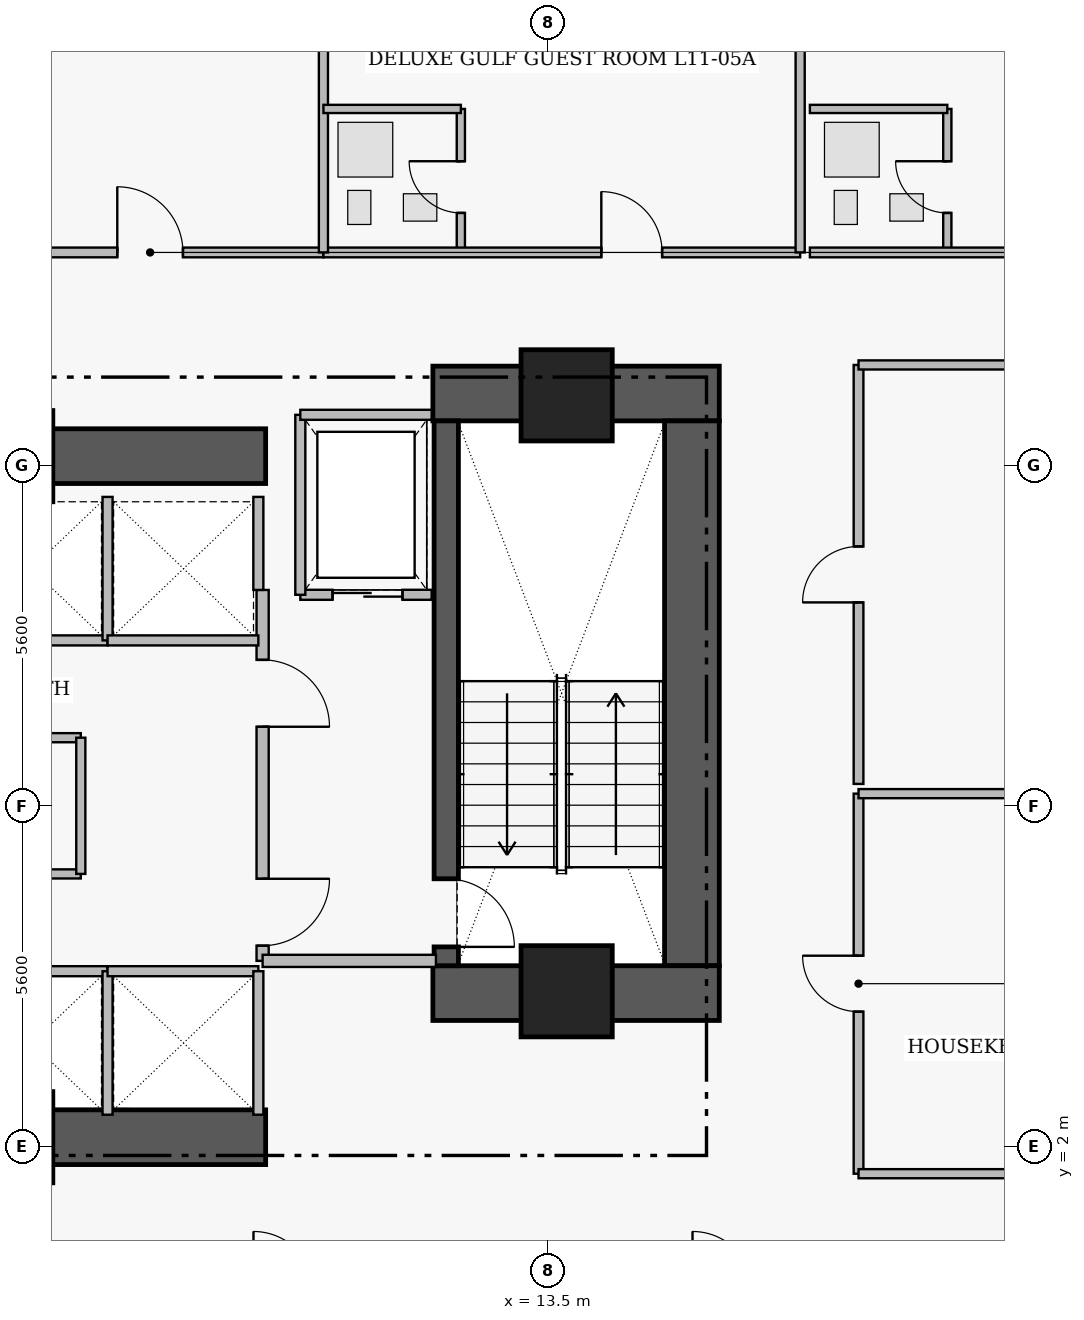
"""IFC4 building model, lengths in metres.
Left out: names, types, materials, properties, quantities, classifications, styles, units other than length and angle.
Written with IfcOpenShell. Run it as: python <this file> out.ifc"""

import sys

from ifc_helpers import new_model, si_unit, direction, frame, frame_2d, origin, origin_2d, place, context, subcontext, project, spatial, rectangle, extrude, element, fill, save


model = new_model("IFC4")
c1 = context("Model", 3, precision=1e-05, world=origin(), true_north=direction((0.0, 1.0)))
c2 = subcontext(c1, "Body", "Model", "MODEL_VIEW")
j1 = project(units=[si_unit("LENGTHUNIT", "METRE"), si_unit("PLANEANGLEUNIT", "RADIAN")], contexts=[c1])
p1 = place(None, origin())
s1 = spatial("IfcSite", under=j1, at=p1, CompositionType="ELEMENT")
p2 = place(p1, origin())
s2 = spatial("IfcBuilding", under=s1, at=p2, CompositionType="ELEMENT")
p3 = place(p2, frame((0.0, 0.0, 49.5)))
s3 = spatial("IfcBuildingStorey", under=s2, at=p3, CompositionType="ELEMENT", Elevation=49.5)
p4 = place(p3, frame((11.6, 14.38, 0.0), z_axis=(0.0, 0.0, 1.0), x_axis=(1.0, 0.0, 0.0)))
e1 = element("IfcWall", 1, at=p4, inside=s3, PredefinedType="SHEAR", context=c2, shape_type="SweptSolid", body=[
    extrude(rectangle(XDim=4.71, YDim=0.9, at=frame_2d((2.355, 0.0))), origin(), (0.0, 0.0, 1.0), 3.46),
])
p5 = place(p3, frame((15.86, 4.97, 0.0), z_axis=(0.0, 0.0, 1.0), x_axis=(0.0, 1.0, 0.0)))
e2 = element("IfcWall", 2, at=p5, inside=s3, PredefinedType="SHEAR", context=c2, shape_type="SweptSolid", body=[
    extrude(rectangle(XDim=8.96, YDim=0.9, at=frame_2d((4.48, 0.0))), origin(), (0.0, 0.0, 1.0), 3.46),
])
p6 = place(p3, frame((11.6, 4.52, 0.0), z_axis=(0.0, 0.0, 1.0), x_axis=(1.0, 0.0, 0.0)))
e3 = element("IfcWall", 3, at=p6, inside=s3, PredefinedType="SHEAR", context=c2, shape_type="SweptSolid", body=[
    extrude(rectangle(XDim=4.71, YDim=0.9, at=frame_2d((2.355, 0.0))), origin(), (0.0, 0.0, 1.0), 3.46),
])
for number, where, z_axis, x_axis in (
    (4, (1.25, 2.15, 0.0), (0.0, 0.0, 1.0), (1.0, 0.0, 0.0)),
    (5, (1.25, 13.35, 0.0), (0.0, 0.0, 1.0), (1.0, 0.0, 0.0)),
):
    element("IfcWall", number, at=place(p3, frame(where, z_axis=z_axis, x_axis=x_axis)), inside=s3, PredefinedType="SHEAR", context=c2, shape_type="SweptSolid", body=[
        extrude(rectangle(XDim=7.6, YDim=0.9, at=frame_2d((3.8, 0.0))), origin(), (0.0, 0.0, 1.0), 3.43),
    ])
p7 = place(p3, frame((11.82, 13.93, 0.0), z_axis=(0.0, 0.0, 1.0), x_axis=(0.0, -1.0, 0.0)))
e6 = element("IfcWall", 6, at=p7, inside=s3, PredefinedType="SHEAR", context=c2, shape_type="SweptSolid", body=[
    extrude(rectangle(XDim=8.96, YDim=0.4, at=frame_2d((4.48, 0.0))), origin(), (0.0, 0.0, 1.0), 3.46),
])
p8 = place(p7, frame((7.53, 0.0, 0.0)))
e7 = element("IfcOpeningElement", 7, at=p8, cuts=e6, PredefinedType="OPENING", context=c2, shape_type="SweptSolid", body=[
    extrude(rectangle(XDim=1.12, YDim=2.22, at=frame_2d((0.56, 1.11))), frame((0.0, 0.21, 0.0), z_axis=(0.0, -1.0, 0.0), x_axis=(1.0, 0.0, 0.0)), (0.0, 0.0, 1.0), 0.42),
])
for number, where, z_axis, x_axis in (
    (8, (13.8, 14.35, 0.0), (0.0, 0.0, 1.0), (1.0, 0.0, 0.0)),
    (9, (13.8, 4.55, 0.0), (0.0, 0.0, 1.0), (1.0, 0.0, 0.0)),
):
    element("IfcColumn", number, at=place(p3, frame(where, z_axis=z_axis, x_axis=x_axis)), inside=s3, PredefinedType="COLUMN", context=c2, shape_type="SweptSolid", body=[
        extrude(rectangle(XDim=1.5, YDim=1.5, at=origin_2d()), origin(), (0.0, 0.0, 1.0), 3.65),
    ])
p9 = place(p3, frame((8.8, 11.15, 0.0), z_axis=(0.0, 0.0, 1.0), x_axis=(0.0, -1.0, 0.0)))
e10 = element("IfcWall", 10, at=p9, inside=s3, PredefinedType="PARTITIONING", context=c2, shape_type="SweptSolid", body=[
    extrude(rectangle(XDim=6.1, YDim=0.2, at=frame_2d((3.05, 0.0))), origin(), (0.0, 0.0, 1.0), 3.43),
])
p10 = place(p9, frame((1.15, 0.0, 0.0)))
e11 = element("IfcOpeningElement", 11, at=p10, cuts=e10, PredefinedType="OPENING", context=c2, shape_type="SweptSolid", body=[
    extrude(rectangle(XDim=1.1, YDim=2.2, at=frame_2d((0.55, 1.1))), frame((0.0, 0.11, 0.0), z_axis=(0.0, -1.0, 0.0), x_axis=(1.0, 0.0, 0.0)), (0.0, 0.0, 1.0), 0.22),
])
p11 = place(p9, frame((4.75, 0.0, 0.0)))
e12 = element("IfcOpeningElement", 12, at=p11, cuts=e10, PredefinedType="OPENING", context=c2, shape_type="SweptSolid", body=[
    extrude(rectangle(XDim=1.1, YDim=2.2, at=frame_2d((0.55, 1.1))), frame((0.0, 0.11, 0.0), z_axis=(0.0, -1.0, 0.0), x_axis=(1.0, 0.0, 0.0)), (0.0, 0.0, 1.0), 0.22),
])
p12 = place(p3, frame((9.42, 11.07, 0.0), z_axis=(0.0, 0.0, 1.0), x_axis=(1.0, 0.0, 0.0)))
e13 = element("IfcWall", 13, at=p12, inside=s3, PredefinedType="PARTITIONING", context=c2, shape_type="SweptSolid", body=[
    extrude(rectangle(XDim=2.16, YDim=0.165, at=frame_2d((1.08, 0.0))), origin(), (0.0, 0.0, 1.0), 3.43),
])
p13 = place(p12, frame((0.53, 0.0, 0.0)))
e14 = element("IfcOpeningElement", 14, at=p13, cuts=e13, PredefinedType="OPENING", context=c2, shape_type="SweptSolid", body=[
    extrude(rectangle(XDim=1.15, YDim=2.25, at=frame_2d((0.575, 1.125))), frame((0.0, 0.093, 0.0), z_axis=(0.0, -1.0, 0.0), x_axis=(1.0, 0.0, 0.0)), (0.0, 0.0, 1.0), 0.185),
])
p14 = place(p3, frame((1.32, 6.48, 0.0), z_axis=(0.0, 0.0, 1.0), x_axis=(1.0, 0.0, 0.0)))
e15 = element("IfcWall", 15, at=p14, inside=s3, PredefinedType="PARTITIONING", context=c2, shape_type="SweptSolid", body=[
    extrude(rectangle(XDim=4.49, YDim=0.15, at=frame_2d((2.245, 0.0))), origin(), (0.0, 0.0, 1.0), 3.43),
])
p15 = place(p14, frame((1.795, 0.0, 0.0)))
e16 = element("IfcOpeningElement", 16, at=p15, cuts=e15, PredefinedType="OPENING", context=c2, shape_type="SweptSolid", body=[
    extrude(rectangle(XDim=0.9, YDim=2.15, at=frame_2d((0.45, 1.075))), frame((0.0, 0.085, 0.0), z_axis=(0.0, -1.0, 0.0), x_axis=(1.0, 0.0, 0.0)), (0.0, 0.0, 1.0), 0.17),
])
p16 = place(p3, frame((2.2, 16.7, 0.0), z_axis=(0.0, 0.0, 1.0), x_axis=(1.0, 0.0, 0.0)))
e17 = element("IfcWall", 17, at=p16, inside=s3, PredefinedType="PARTITIONING", context=c2, shape_type="SweptSolid", body=[
    extrude(rectangle(XDim=7.6, YDim=0.16, at=frame_2d((3.8, 0.0))), origin(), (0.0, 0.0, 1.0), 2.973),
])
p17 = place(p16, frame((4.21, 0.0, 0.0)))
e18 = element("IfcOpeningElement", 18, at=p17, cuts=e17, PredefinedType="OPENING", context=c2, shape_type="SweptSolid", body=[
    extrude(rectangle(XDim=1.08, YDim=2.18, at=frame_2d((0.54, 1.09))), frame((0.0, 0.09, 0.0), z_axis=(0.0, -1.0, 0.0), x_axis=(1.0, 0.0, 0.0)), (0.0, 0.0, 1.0), 0.18),
])
p18 = place(p3, frame((12.06, 16.7, 0.0), z_axis=(0.0, 0.0, 1.0), x_axis=(0.0, 1.0, 0.0)))
e19 = element("IfcWall", 19, at=p18, inside=s3, PredefinedType="PLUMBINGWALL", context=c2, shape_type="SweptSolid", body=[
    extrude(rectangle(XDim=2.36, YDim=0.135, at=frame_2d((1.18, 0.0))), origin(), (0.0, 0.0, 1.0), 3.43),
])
p19 = place(p18, frame((0.65, 0.0, 0.0)))
e20 = element("IfcOpeningElement", 20, at=p19, cuts=e19, PredefinedType="OPENING", context=c2, shape_type="SweptSolid", body=[
    extrude(rectangle(XDim=0.85, YDim=2.1, at=frame_2d((0.425, 1.05))), frame((0.0, 0.077, 0.0), z_axis=(0.0, -1.0, 0.0), x_axis=(1.0, 0.0, 0.0)), (0.0, 0.0, 1.0), 0.155),
])
p20 = place(p3, frame((9.8, 16.7, 0.0), z_axis=(0.0, 0.0, 1.0), x_axis=(1.0, 0.0, 0.0)))
e21 = element("IfcWall", 21, at=p20, inside=s3, PredefinedType="PARTITIONING", context=c2, shape_type="SweptSolid", body=[
    extrude(rectangle(XDim=7.84, YDim=0.16, at=frame_2d((3.92, 0.0))), origin(), (0.0, 0.0, 1.0), 2.973),
])
p21 = place(p20, frame((4.57, 0.0, 0.0)))
e22 = element("IfcOpeningElement", 22, at=p21, cuts=e21, PredefinedType="OPENING", context=c2, shape_type="SweptSolid", body=[
    extrude(rectangle(XDim=1.0, YDim=2.15, at=frame_2d((0.5, 1.075))), frame((0.0, 0.09, 0.0), z_axis=(0.0, -1.0, 0.0), x_axis=(1.0, 0.0, 0.0)), (0.0, 0.0, 1.0), 0.18),
])
p22 = place(p3, frame((20.06, 16.7, 0.0), z_axis=(0.0, 0.0, 1.0), x_axis=(0.0, 1.0, 0.0)))
e23 = element("IfcWall", 23, at=p22, inside=s3, PredefinedType="PLUMBINGWALL", context=c2, shape_type="SweptSolid", body=[
    extrude(rectangle(XDim=2.36, YDim=0.135, at=frame_2d((1.18, 0.0))), origin(), (0.0, 0.0, 1.0), 3.43),
])
p23 = place(p22, frame((0.65, 0.0, 0.0)))
e24 = element("IfcOpeningElement", 24, at=p23, cuts=e23, PredefinedType="OPENING", context=c2, shape_type="SweptSolid", body=[
    extrude(rectangle(XDim=0.85, YDim=2.1, at=frame_2d((0.425, 1.05))), frame((0.0, 0.077, 0.0), z_axis=(0.0, -1.0, 0.0), x_axis=(1.0, 0.0, 0.0)), (0.0, 0.0, 1.0), 0.155),
])
p24 = place(p3, frame((17.8, 16.7, 0.0), z_axis=(0.0, 0.0, 1.0), x_axis=(1.0, 0.0, 0.0)))
e25 = element("IfcWall", 25, at=p24, inside=s3, PredefinedType="PARTITIONING", context=c2, shape_type="SweptSolid", body=[
    extrude(rectangle(XDim=7.84, YDim=0.16, at=frame_2d((3.92, 0.0))), origin(), (0.0, 0.0, 1.0), 3.43),
])
p25 = place(p24, frame((4.57, 0.0, 0.0)))
e26 = element("IfcOpeningElement", 26, at=p25, cuts=e25, PredefinedType="OPENING", context=c2, shape_type="SweptSolid", body=[
    extrude(rectangle(XDim=1.0, YDim=2.15, at=frame_2d((0.5, 1.075))), frame((0.0, 0.09, 0.0), z_axis=(0.0, -1.0, 0.0), x_axis=(1.0, 0.0, 0.0)), (0.0, 0.0, 1.0), 0.18),
])
p26 = place(p3, frame((18.6, 1.55, 0.0), z_axis=(0.0, 0.0, 1.0), x_axis=(0.0, 1.0, 0.0)))
e27 = element("IfcWall", 27, at=p26, inside=s3, PredefinedType="PARTITIONING", context=c2, shape_type="SweptSolid", body=[
    extrude(rectangle(XDim=6.25, YDim=0.16, at=frame_2d((3.125, 0.0))), origin(), (0.0, 0.0, 1.0), 3.43),
])
p27 = place(p26, frame((2.665, 0.0, 0.0)))
e28 = element("IfcOpeningElement", 28, at=p27, cuts=e27, PredefinedType="OPENING", context=c2, shape_type="SweptSolid", body=[
    extrude(rectangle(XDim=0.92, YDim=2.12, at=frame_2d((0.46, 1.06))), frame((0.0, 0.09, 0.0), z_axis=(0.0, -1.0, 0.0), x_axis=(1.0, 0.0, 0.0)), (0.0, 0.0, 1.0), 0.18),
])
p28 = place(p3, frame((18.6, 7.96, 0.0), z_axis=(0.0, 0.0, 1.0), x_axis=(0.0, 1.0, 0.0)))
e29 = element("IfcWall", 29, at=p28, inside=s3, PredefinedType="PARTITIONING", context=c2, shape_type="SweptSolid", body=[
    extrude(rectangle(XDim=6.89, YDim=0.16, at=frame_2d((3.445, 0.0))), origin(), (0.0, 0.0, 1.0), 3.43),
])
p29 = place(p28, frame((2.985, 0.0, 0.0)))
e30 = element("IfcOpeningElement", 30, at=p29, cuts=e29, PredefinedType="OPENING", context=c2, shape_type="SweptSolid", body=[
    extrude(rectangle(XDim=0.92, YDim=2.12, at=frame_2d((0.46, 1.06))), frame((0.0, 0.09, 0.0), z_axis=(0.0, -1.0, 0.0), x_axis=(1.0, 0.0, 0.0)), (0.0, 0.0, 1.0), 0.18),
])
p30 = place(p3, frame((8.8, 5.05, 0.0), z_axis=(0.0, 0.0, 1.0), x_axis=(1.0, 0.0, 0.0)))
e31 = element("IfcWall", 31, at=p30, inside=s3, PredefinedType="PARTITIONING", context=c2, shape_type="SweptSolid", body=[
    extrude(rectangle(XDim=2.85, YDim=0.2, at=frame_2d((1.425, 0.0))), origin(), (0.0, 0.0, 1.0), 3.43),
])
p31 = place(p3, frame((9.42, 11.07, 0.0), z_axis=(0.0, 0.0, 1.0), x_axis=(0.0, 1.0, 0.0)))
e32 = element("IfcWall", 32, at=p31, inside=s3, PredefinedType="PARTITIONING", context=c2, shape_type="SweptSolid", body=[
    extrude(rectangle(XDim=2.96, YDim=0.165, at=frame_2d((1.48, 0.0))), origin(), (0.0, 0.0, 1.0), 3.43),
])
p32 = place(p3, frame((9.42, 14.03, 0.0), z_axis=(0.0, 0.0, 1.0), x_axis=(1.0, 0.0, 0.0)))
e33 = element("IfcWall", 33, at=p32, inside=s3, PredefinedType="PARTITIONING", context=c2, shape_type="SweptSolid", body=[
    extrude(rectangle(XDim=2.16, YDim=0.165, at=frame_2d((1.08, 0.0))), origin(), (0.0, 0.0, 1.0), 3.43),
])
p33 = place(p3, frame((3.75, 4.88, 0.0), z_axis=(0.0, 0.0, 1.0), x_axis=(1.0, 0.0, 0.0)))
e34 = element("IfcWall", 34, at=p33, inside=s3, PredefinedType="PARTITIONING", context=c2, shape_type="SweptSolid", body=[
    extrude(rectangle(XDim=2.5, YDim=0.165, at=frame_2d((1.25, 0.0))), origin(), (0.0, 0.0, 1.0), 3.43),
])
p34 = place(p3, frame((6.25, 2.52, 0.0), z_axis=(0.0, 0.0, 1.0), x_axis=(0.0, 1.0, 0.0)))
e35 = element("IfcWall", 35, at=p34, inside=s3, PredefinedType="PARTITIONING", context=c2, shape_type="SweptSolid", body=[
    extrude(rectangle(XDim=2.36, YDim=0.165, at=frame_2d((1.18, 0.0))), origin(), (0.0, 0.0, 1.0), 3.43),
])
p35 = place(p3, frame((6.25, 4.88, 0.0), z_axis=(0.0, 0.0, 1.0), x_axis=(1.0, 0.0, 0.0)))
e36 = element("IfcWall", 36, at=p35, inside=s3, PredefinedType="PARTITIONING", context=c2, shape_type="SweptSolid", body=[
    extrude(rectangle(XDim=2.48, YDim=0.165, at=frame_2d((1.24, 0.0))), origin(), (0.0, 0.0, 1.0), 3.43),
])
p36 = place(p3, frame((8.73, 2.52, 0.0), z_axis=(0.0, 0.0, 1.0), x_axis=(0.0, 1.0, 0.0)))
e37 = element("IfcWall", 37, at=p36, inside=s3, PredefinedType="PARTITIONING", context=c2, shape_type="SweptSolid", body=[
    extrude(rectangle(XDim=2.36, YDim=0.165, at=frame_2d((1.18, 0.0))), origin(), (0.0, 0.0, 1.0), 3.43),
])
p37 = place(p3, frame((3.75, 10.32, 0.0), z_axis=(0.0, 0.0, 1.0), x_axis=(1.0, 0.0, 0.0)))
e38 = element("IfcWall", 38, at=p37, inside=s3, PredefinedType="PARTITIONING", context=c2, shape_type="SweptSolid", body=[
    extrude(rectangle(XDim=2.5, YDim=0.165, at=frame_2d((1.25, 0.0))), origin(), (0.0, 0.0, 1.0), 3.43),
])
p38 = place(p3, frame((6.25, 10.32, 0.0), z_axis=(0.0, 0.0, 1.0), x_axis=(0.0, 1.0, 0.0)))
e39 = element("IfcWall", 39, at=p38, inside=s3, PredefinedType="PARTITIONING", context=c2, shape_type="SweptSolid", body=[
    extrude(rectangle(XDim=2.36, YDim=0.165, at=frame_2d((1.18, 0.0))), origin(), (0.0, 0.0, 1.0), 3.43),
])
p39 = place(p3, frame((6.25, 10.32, 0.0), z_axis=(0.0, 0.0, 1.0), x_axis=(1.0, 0.0, 0.0)))
e40 = element("IfcWall", 40, at=p39, inside=s3, PredefinedType="PARTITIONING", context=c2, shape_type="SweptSolid", body=[
    extrude(rectangle(XDim=2.48, YDim=0.165, at=frame_2d((1.24, 0.0))), origin(), (0.0, 0.0, 1.0), 3.43),
])
p40 = place(p3, frame((8.73, 11.15, 0.0), z_axis=(0.0, 0.0, 1.0), x_axis=(0.0, 1.0, 0.0)))
e41 = element("IfcWall", 41, at=p40, inside=s3, PredefinedType="PARTITIONING", context=c2, shape_type="SweptSolid", body=[
    extrude(rectangle(XDim=1.53, YDim=0.165, at=frame_2d((0.765, 0.0))), origin(), (0.0, 0.0, 1.0), 3.43),
])
p41 = place(p3, frame((1.32, 8.72, 0.0), z_axis=(0.0, 0.0, 1.0), x_axis=(1.0, 0.0, 0.0)))
e42 = element("IfcWall", 42, at=p41, inside=s3, PredefinedType="PARTITIONING", context=c2, shape_type="SweptSolid", body=[
    extrude(rectangle(XDim=4.49, YDim=0.15, at=frame_2d((2.245, 0.0))), origin(), (0.0, 0.0, 1.0), 3.43),
])
p42 = place(p3, frame((5.81, 6.48, 0.0), z_axis=(0.0, 0.0, 1.0), x_axis=(0.0, 1.0, 0.0)))
e43 = element("IfcWall", 43, at=p42, inside=s3, PredefinedType="PARTITIONING", context=c2, shape_type="SweptSolid", body=[
    extrude(rectangle(XDim=2.24, YDim=0.15, at=frame_2d((1.12, 0.0))), origin(), (0.0, 0.0, 1.0), 3.43),
])
p43 = place(p3, frame((9.8, 16.7, 0.0), z_axis=(0.0, 0.0, 1.0), x_axis=(0.0, 1.0, 0.0)))
e44 = element("IfcWall", 44, at=p43, inside=s3, PredefinedType="PARTITIONING", context=c2, shape_type="SweptSolid", body=[
    extrude(rectangle(XDim=6.34, YDim=0.15, at=frame_2d((3.17, 0.0))), origin(), (0.0, 0.0, 1.0), 3.43),
])
p44 = place(p3, frame((9.8, 19.06, 0.0), z_axis=(0.0, 0.0, 1.0), x_axis=(1.0, 0.0, 0.0)))
e45 = element("IfcWall", 45, at=p44, inside=s3, PredefinedType="PLUMBINGWALL", context=c2, shape_type="SweptSolid", body=[
    extrude(rectangle(XDim=2.26, YDim=0.135, at=frame_2d((1.13, 0.0))), origin(), (0.0, 0.0, 1.0), 2.973),
])
p45 = place(p3, frame((17.64, 16.7, 0.0), z_axis=(0.0, 0.0, 1.0), x_axis=(0.0, 1.0, 0.0)))
e46 = element("IfcWall", 46, at=p45, inside=s3, PredefinedType="PARTITIONING", context=c2, shape_type="SweptSolid", body=[
    extrude(rectangle(XDim=6.32, YDim=0.15, at=frame_2d((3.16, 0.0))), origin(), (0.0, 0.0, 1.0), 3.43),
])
p46 = place(p3, frame((17.8, 19.06, 0.0), z_axis=(0.0, 0.0, 1.0), x_axis=(1.0, 0.0, 0.0)))
e47 = element("IfcWall", 47, at=p46, inside=s3, PredefinedType="PLUMBINGWALL", context=c2, shape_type="SweptSolid", body=[
    extrude(rectangle(XDim=2.26, YDim=0.135, at=frame_2d((1.13, 0.0))), origin(), (0.0, 0.0, 1.0), 3.43),
])
p47 = place(p3, frame((18.6, 1.55, 0.0), z_axis=(0.0, 0.0, 1.0), x_axis=(1.0, 0.0, 0.0)))
e48 = element("IfcWall", 48, at=p47, inside=s3, PredefinedType="PARTITIONING", context=c2, shape_type="SweptSolid", body=[
    extrude(rectangle(XDim=9.005, YDim=0.15, at=frame_2d((4.503, 0.0))), origin(), (0.0, 0.0, 1.0), 3.43),
])
for number, where, z_axis, x_axis in (
    (49, (18.6, 7.8, 0.0), (0.0, 0.0, 1.0), (1.0, 0.0, 0.0)),
    (50, (18.6, 14.85, 0.0), (0.0, 0.0, 1.0), (1.0, 0.0, 0.0)),
):
    element("IfcWall", number, at=place(p3, frame(where, z_axis=z_axis, x_axis=x_axis)), inside=s3, PredefinedType="PARTITIONING", context=c2, shape_type="SweptSolid", body=[
        extrude(rectangle(XDim=7.04, YDim=0.15, at=frame_2d((3.52, 0.0))), origin(), (0.0, 0.0, 1.0), 3.43),
    ])
p48 = place(p8, origin())
e51 = element("IfcDoor", 51, at=p48, inside=s3, OperationType="SINGLE_SWING_RIGHT", PredefinedType="DOOR", context=c2, shape_type="SweptSolid", body=[
    extrude(rectangle(XDim=1.12, YDim=2.22, at=frame_2d((0.56, 1.11))), frame((0.0, 0.025, 0.0), z_axis=(0.0, -1.0, 0.0), x_axis=(1.0, 0.0, 0.0)), (0.0, 0.0, 1.0), 0.05),
])
fill(e7, e51)
p49 = place(p10, origin())
e52 = element("IfcDoor", 52, at=p49, inside=s3, OperationType="SINGLE_SWING_RIGHT", PredefinedType="DOOR", context=c2, shape_type="SweptSolid", body=[
    extrude(rectangle(XDim=1.1, YDim=2.2, at=frame_2d((0.55, 1.1))), frame((0.0, 0.025, 0.0), z_axis=(0.0, -1.0, 0.0), x_axis=(1.0, 0.0, 0.0)), (0.0, 0.0, 1.0), 0.05),
])
fill(e11, e52)
p50 = place(p11, origin())
e53 = element("IfcDoor", 53, at=p50, inside=s3, OperationType="SINGLE_SWING_LEFT", PredefinedType="DOOR", context=c2, shape_type="SweptSolid", body=[
    extrude(rectangle(XDim=1.1, YDim=2.2, at=frame_2d((0.55, 1.1))), frame((0.0, 0.025, 0.0), z_axis=(0.0, -1.0, 0.0), x_axis=(1.0, 0.0, 0.0)), (0.0, 0.0, 1.0), 0.05),
])
fill(e12, e53)
p51 = place(p13, origin())
e54 = element("IfcDoor", 54, at=p51, inside=s3, OperationType="SLIDING_TO_LEFT", PredefinedType="DOOR", context=c2, shape_type="SweptSolid", body=[
    extrude(rectangle(XDim=1.15, YDim=2.25, at=frame_2d((0.575, 1.125))), frame((0.0, 0.025, 0.0), z_axis=(0.0, -1.0, 0.0), x_axis=(1.0, 0.0, 0.0)), (0.0, 0.0, 1.0), 0.05),
])
fill(e14, e54)
p52 = place(p17, origin())
e55 = element("IfcDoor", 55, at=p52, inside=s3, OperationType="SINGLE_SWING_LEFT", PredefinedType="DOOR", context=c2, shape_type="SweptSolid", body=[
    extrude(rectangle(XDim=1.08, YDim=2.18, at=frame_2d((0.54, 1.09))), frame((0.0, 0.025, 0.0), z_axis=(0.0, -1.0, 0.0), x_axis=(1.0, 0.0, 0.0)), (0.0, 0.0, 1.0), 0.05),
])
fill(e18, e55)
p53 = place(p19, origin())
e56 = element("IfcDoor", 56, at=p53, inside=s3, OperationType="SINGLE_SWING_RIGHT", PredefinedType="DOOR", context=c2, shape_type="SweptSolid", body=[
    extrude(rectangle(XDim=0.85, YDim=2.1, at=frame_2d((0.425, 1.05))), frame((0.0, 0.025, 0.0), z_axis=(0.0, -1.0, 0.0), x_axis=(1.0, 0.0, 0.0)), (0.0, 0.0, 1.0), 0.05),
])
fill(e20, e56)
p54 = place(p21, origin())
e57 = element("IfcDoor", 57, at=p54, inside=s3, OperationType="SINGLE_SWING_LEFT", PredefinedType="DOOR", context=c2, shape_type="SweptSolid", body=[
    extrude(rectangle(XDim=1.0, YDim=2.15, at=frame_2d((0.5, 1.075))), frame((0.0, 0.025, 0.0), z_axis=(0.0, -1.0, 0.0), x_axis=(1.0, 0.0, 0.0)), (0.0, 0.0, 1.0), 0.05),
])
fill(e22, e57)
p55 = place(p23, origin())
e58 = element("IfcDoor", 58, at=p55, inside=s3, OperationType="SINGLE_SWING_RIGHT", PredefinedType="DOOR", context=c2, shape_type="SweptSolid", body=[
    extrude(rectangle(XDim=0.85, YDim=2.1, at=frame_2d((0.425, 1.05))), frame((0.0, 0.025, 0.0), z_axis=(0.0, -1.0, 0.0), x_axis=(1.0, 0.0, 0.0)), (0.0, 0.0, 1.0), 0.05),
])
fill(e24, e58)
p56 = place(p27, origin())
e59 = element("IfcDoor", 59, at=p56, inside=s3, OperationType="SINGLE_SWING_RIGHT", PredefinedType="DOOR", context=c2, shape_type="SweptSolid", body=[
    extrude(rectangle(XDim=0.92, YDim=2.12, at=frame_2d((0.46, 1.06))), frame((0.0, 0.025, 0.0), z_axis=(0.0, -1.0, 0.0), x_axis=(1.0, 0.0, 0.0)), (0.0, 0.0, 1.0), 0.05),
])
fill(e28, e59)
p57 = place(p29, origin())
e60 = element("IfcDoor", 60, at=p57, inside=s3, OperationType="SINGLE_SWING_LEFT", PredefinedType="DOOR", context=c2, shape_type="SweptSolid", body=[
    extrude(rectangle(XDim=0.92, YDim=2.12, at=frame_2d((0.46, 1.06))), frame((0.0, 0.025, 0.0), z_axis=(0.0, -1.0, 0.0), x_axis=(1.0, 0.0, 0.0)), (0.0, 0.0, 1.0), 0.05),
])
fill(e30, e60)
save(model, sys.argv[1])
